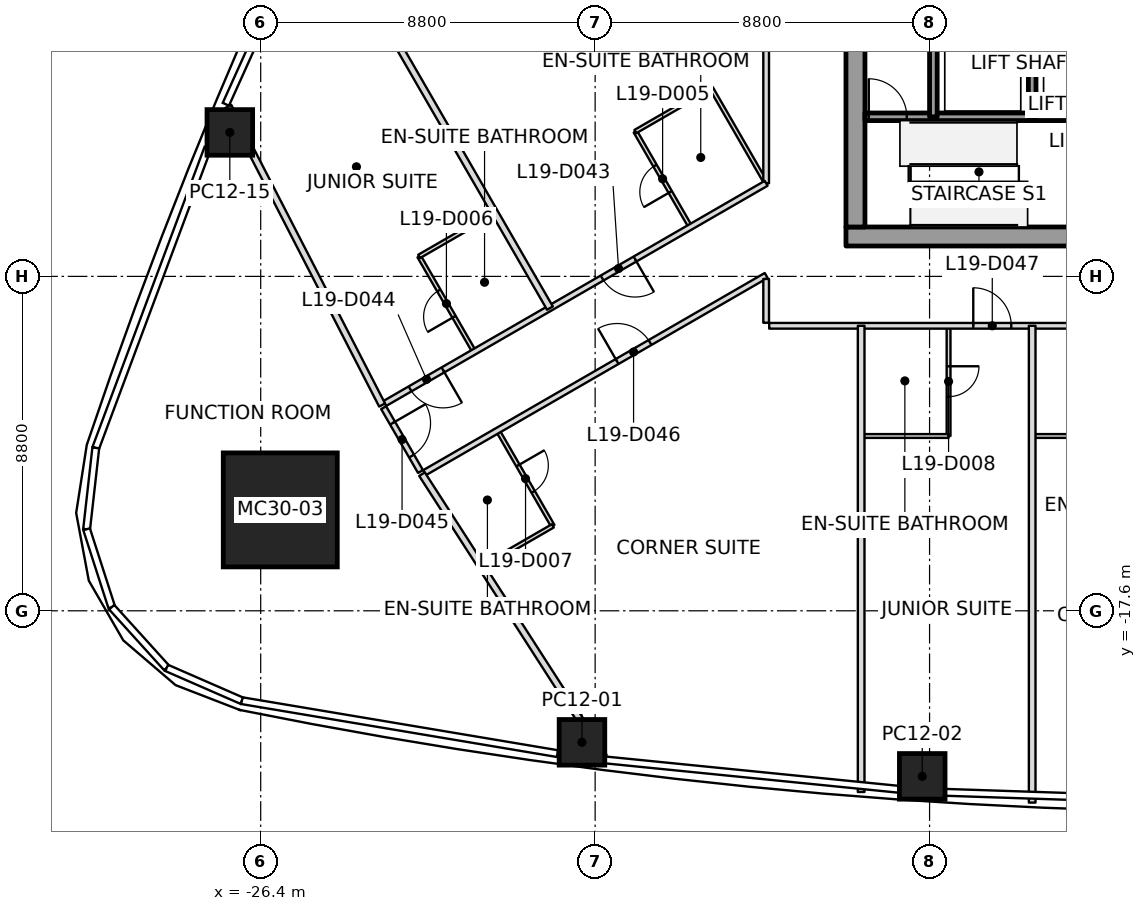
"""IFC4 building model, lengths in metres.
Left out: names, types, materials, properties, quantities, classifications, styles, units other than length and angle.
Written with IfcOpenShell. Run it as: python <this file> out.ifc"""

import sys

from ifc_helpers import new_model, si_unit, direction, frame, frame_2d, origin, origin_2d, place, context, subcontext, project, spatial, rectangle, extrude, element, fill, save


model = new_model("IFC4")
c1 = context("Model", 3, precision=1e-05, world=origin(), true_north=direction((0.0, 1.0)))
c2 = subcontext(c1, "Body", "Model", "MODEL_VIEW")
j1 = project(units=[si_unit("LENGTHUNIT", "METRE"), si_unit("PLANEANGLEUNIT", "RADIAN")], contexts=[c1])
p1 = place(None, origin())
s1 = spatial("IfcSite", under=j1, at=p1, CompositionType="ELEMENT")
p2 = place(p1, origin())
s2 = spatial("IfcBuilding", under=s1, at=p2, CompositionType="ELEMENT")
p3 = place(p2, frame((0.0, 0.0, 92.4)))
s3 = spatial("IfcBuildingStorey", under=s2, at=p3, CompositionType="ELEMENT", Elevation=92.4)
p4 = place(p3, frame((-25.885, -14.945, 0.0), z_axis=(0.030464101799, 0.017605877014, 0.99938079409), x_axis=(0.999535861539, -0.000536596285, -0.030459375615)))
e1 = element("IfcColumn", 1, at=p4, inside=s3, PredefinedType="COLUMN", context=c2, shape_type="SweptSolid", body=[
    extrude(rectangle(XDim=3.0, YDim=3.0, at=origin_2d()), origin(), (0.0, 0.0, 1.0), 3.702),
])
p5 = place(p3, frame((-17.946, -21.061, 0.0), z_axis=(0.019195542948, 0.011345819199, 0.999751370851), x_axis=(-0.990992704509, 0.132764775419, 0.017520674033)))
e2 = element("IfcColumn", 2, at=p5, inside=s3, PredefinedType="COLUMN", context=c2, shape_type="SweptSolid", body=[
    extrude(rectangle(XDim=1.2, YDim=1.2, at=origin_2d()), origin(), (0.0, 0.0, 1.0), 3.701),
])
p6 = place(p3, frame((-8.993, -21.957, 0.0), z_axis=(0.009566025428, 0.012138956406, 0.999880561315), x_axis=(-0.997745739106, 0.066536385186, 0.008737822466)))
e3 = element("IfcColumn", 3, at=p6, inside=s3, PredefinedType="COLUMN", context=c2, shape_type="SweptSolid", body=[
    extrude(rectangle(XDim=1.2, YDim=1.2, at=origin_2d()), origin(), (0.0, 0.0, 1.0), 3.701),
])
p7 = place(p3, frame((-27.212, -5.011, 0.0), z_axis=(0.019393432612, 0.011015997436, 0.999751240345), x_axis=(0.380717970692, 0.924524223098, -0.017572356073)))
e4 = element("IfcColumn", 4, at=p7, inside=s3, PredefinedType="COLUMN", context=c2, shape_type="SweptSolid", body=[
    extrude(rectangle(XDim=1.2, YDim=1.2, at=origin_2d()), origin(), (0.0, 0.0, 1.0), 3.701),
])
p8 = place(p3, frame((-11.0, -7.75, 0.0), z_axis=(0.0, 0.0, 1.0), x_axis=(1.0, 0.0, 0.0)))
e5 = element("IfcWall", 5, at=p8, inside=s3, PredefinedType="SHEAR", context=c2, shape_type="SweptSolid", body=[
    extrude(rectangle(XDim=22.0, YDim=0.5, at=frame_2d((11.0, 0.0))), origin(), (0.0, 0.0, 1.0), 3.7),
])
p9 = place(p8, frame((10.45, 0.0, 0.0)))
e6 = element("IfcOpeningElement", 6, at=p9, cuts=e5, PredefinedType="OPENING", context=c2, shape_type="SweptSolid", body=[
    extrude(rectangle(XDim=1.1, YDim=2.1, at=frame_2d((0.55, 1.05))), frame((0.0, 0.25, 0.0), z_axis=(0.0, -1.0, 0.0), x_axis=(1.0, 0.0, 0.0)), (0.0, 0.0, 1.0), 0.5),
])
p10 = place(p3, frame((-10.75, -7.5, 0.0), z_axis=(0.0, 0.0, 1.0), x_axis=(0.0, 1.0, 0.0)))
e7 = element("IfcWall", 7, at=p10, inside=s3, PredefinedType="SHEAR", context=c2, shape_type="SweptSolid", body=[
    extrude(rectangle(XDim=15.0, YDim=0.5, at=frame_2d((7.5, 0.0))), origin(), (0.0, 0.0, 1.0), 3.7),
])
p11 = place(p10, frame((6.6, 0.0, 0.0)))
e8 = element("IfcOpeningElement", 8, at=p11, cuts=e7, PredefinedType="OPENING", context=c2, shape_type="SweptSolid", body=[
    extrude(rectangle(XDim=1.8, YDim=2.1, at=frame_2d((0.9, 1.05))), frame((0.0, 0.25, 0.0), z_axis=(0.0, -1.0, 0.0), x_axis=(1.0, 0.0, 0.0)), (0.0, 0.0, 1.0), 0.5),
])
p12 = place(p3, frame((-10.5, -4.6, 0.0), z_axis=(0.0, 0.0, 1.0), x_axis=(1.0, 0.0, 0.0)))
e9 = element("IfcWall", 9, at=p12, inside=s3, PredefinedType="SOLIDWALL", context=c2, shape_type="SweptSolid", body=[
    extrude(rectangle(XDim=1.8, YDim=0.2, at=frame_2d((0.9, 0.0))), origin(), (0.0, 0.0, 1.0), 3.55),
])
p13 = place(p12, frame((0.1, 0.0, 0.0)))
e10 = element("IfcOpeningElement", 10, at=p13, cuts=e9, PredefinedType="OPENING", context=c2, shape_type="SweptSolid", body=[
    extrude(rectangle(XDim=1.0, YDim=2.1, at=frame_2d((0.5, 1.05))), frame((0.0, 0.1, 0.0), z_axis=(0.0, -1.0, 0.0), x_axis=(1.0, 0.0, 0.0)), (0.0, 0.0, 1.0), 0.2),
])
p14 = place(p3, frame((-8.7, -4.6, 0.0), z_axis=(0.0, 0.0, 1.0), x_axis=(1.0, 0.0, 0.0)))
e11 = element("IfcWall", 11, at=p14, inside=s3, PredefinedType="SOLIDWALL", context=c2, shape_type="SweptSolid", body=[
    extrude(rectangle(XDim=2.6, YDim=0.2, at=frame_2d((1.3, 0.0))), origin(), (0.0, 0.0, 1.0), 3.55),
])
p15 = place(p3, frame((-8.7, -4.6, 0.0), z_axis=(0.0, 0.0, 1.0), x_axis=(0.0, 1.0, 0.0)))
e12 = element("IfcWall", 12, at=p15, inside=s3, PredefinedType="SOLIDWALL", context=c2, shape_type="SweptSolid", body=[
    extrude(rectangle(XDim=2.8, YDim=0.2, at=frame_2d((1.4, 0.0))), origin(), (0.0, 0.0, 1.0), 3.55),
])
p16 = place(p3, frame((-6.1, -4.6, 0.0), z_axis=(0.0, 0.0, 1.0), x_axis=(1.0, 0.0, 0.0)))
e13 = element("IfcWall", 13, at=p16, inside=s3, PredefinedType="SOLIDWALL", context=c2, shape_type="SweptSolid", body=[
    extrude(rectangle(XDim=1.6, YDim=0.2, at=frame_2d((0.8, 0.0))), origin(), (0.0, 0.0, 1.0), 3.55),
])
p17 = place(p3, frame((-6.1, -4.6, 0.0), z_axis=(0.0, 0.0, 1.0), x_axis=(0.0, 1.0, 0.0)))
e14 = element("IfcWall", 14, at=p17, inside=s3, PredefinedType="SOLIDWALL", context=c2, shape_type="SweptSolid", body=[
    extrude(rectangle(XDim=2.8, YDim=0.2, at=frame_2d((1.4, 0.0))), origin(), (0.0, 0.0, 1.0), 3.55),
])
p18 = place(p3, frame((-23.206, -12.185, 0.0), z_axis=(0.0, 0.0, 1.0), x_axis=(-0.457776028904, 0.88906754938, 0.0)))
e15 = element("IfcWall", 15, at=p18, inside=s3, PredefinedType="PARTITIONING", context=c2, shape_type="SweptSolid", body=[
    extrude(rectangle(XDim=8.84, YDim=0.175, at=frame_2d((4.42, 0.0))), origin(), (0.0, 0.0, 1.0), 3.15),
])
p19 = place(p3, frame((-18.789, -9.635, 0.0), z_axis=(0.0, 0.0, 1.0), x_axis=(-0.500005395086, 0.866022288908, 0.0)))
e16 = element("IfcWall", 16, at=p19, inside=s3, PredefinedType="PARTITIONING", context=c2, shape_type="SweptSolid", body=[
    extrude(rectangle(XDim=12.523, YDim=0.175, at=frame_2d((6.262, 0.0))), origin(), (0.0, 0.0, 1.0), 2.934),
])
p20 = place(p3, frame((-17.372, -21.439, 0.0), z_axis=(0.0, 0.0, 1.0), x_axis=(-0.541052062042, 0.840989099906, 0.0)))
e17 = element("IfcWall", 17, at=p20, inside=s3, PredefinedType="PARTITIONING", context=c2, shape_type="SweptSolid", body=[
    extrude(rectangle(XDim=8.841, YDim=0.175, at=frame_2d((4.42, 0.0))), origin(), (0.0, 0.0, 1.0), 3.15),
])
p21 = place(p3, frame((-10.6, -10.1, 0.0), z_axis=(0.0, 0.0, 1.0), x_axis=(0.0, -1.0, 0.0)))
e18 = element("IfcWall", 18, at=p21, inside=s3, PredefinedType="PARTITIONING", context=c2, shape_type="SweptSolid", body=[
    extrude(rectangle(XDim=12.268, YDim=0.175, at=frame_2d((6.134, 0.0))), origin(), (0.0, 0.0, 1.0), 2.934),
])
p22 = place(p3, frame((-6.1, -10.1, 0.0), z_axis=(0.0, 0.0, 1.0), x_axis=(0.0, -1.0, 0.0)))
e19 = element("IfcWall", 19, at=p22, inside=s3, PredefinedType="PARTITIONING", context=c2, shape_type="SweptSolid", body=[
    extrude(rectangle(XDim=12.547, YDim=0.175, at=frame_2d((6.273, 0.0))), origin(), (0.0, 0.0, 1.0), 2.934),
])
p23 = place(p3, frame((-23.166, -12.255, 0.0), z_axis=(0.0, 0.0, 1.0), x_axis=(0.499969367985, -0.866043088465, 0.0)))
e20 = element("IfcWall", 20, at=p23, inside=s3, PredefinedType="PARTITIONING", context=c2, shape_type="SweptSolid", body=[
    extrude(rectangle(XDim=1.94, YDim=0.15, at=frame_2d((0.97, 0.0))), origin(), (0.0, 0.0, 1.0), 2.797),
])
p24 = place(p23, frame((0.47, 0.0, 0.0)))
e21 = element("IfcOpeningElement", 21, at=p24, cuts=e20, PredefinedType="OPENING", context=c2, shape_type="SweptSolid", body=[
    extrude(rectangle(XDim=1.0, YDim=2.1, at=frame_2d((0.5, 1.05))), frame((0.0, 0.075, 0.0), z_axis=(0.0, -1.0, 0.0), x_axis=(1.0, 0.0, 0.0)), (0.0, 0.0, 1.0), 0.15),
])
p25 = place(p3, frame((-13.1, 10.02, 0.0), z_axis=(0.0, 0.0, 1.0), x_axis=(0.0, -1.0, 0.0)))
e22 = element("IfcWall", 22, at=p25, inside=s3, PredefinedType="PARTITIONING", context=c2, shape_type="SweptSolid", body=[
    extrude(rectangle(XDim=16.371, YDim=0.15, at=frame_2d((8.186, 0.0))), origin(), (0.0, 0.0, 1.0), 2.947),
])
p26 = place(p25, frame((6.295, 0.0, 0.0)))
e23 = element("IfcOpeningElement", 23, at=p26, cuts=e22, PredefinedType="OPENING", context=c2, shape_type="SweptSolid", body=[
    extrude(rectangle(XDim=1.0, YDim=2.1, at=frame_2d((0.5, 1.05))), frame((0.0, 0.075, 0.0), z_axis=(0.0, -1.0, 0.0), x_axis=(1.0, 0.0, 0.0)), (0.0, 0.0, 1.0), 0.15),
])
p27 = place(p3, frame((-13.1, -6.351, 0.0), z_axis=(0.0, 0.0, 1.0), x_axis=(-0.866028069402, -0.499995382986, 0.0)))
e24 = element("IfcWall", 24, at=p27, inside=s3, PredefinedType="PARTITIONING", context=c2, shape_type="SweptSolid", body=[
    extrude(rectangle(XDim=11.589, YDim=0.15, at=frame_2d((5.794, 0.0))), origin(), (0.0, 0.0, 1.0), 2.947),
])
p28 = place(p27, frame((3.985, 0.0, 0.0)))
e25 = element("IfcOpeningElement", 25, at=p28, cuts=e24, PredefinedType="OPENING", context=c2, shape_type="SweptSolid", body=[
    extrude(rectangle(XDim=1.0, YDim=2.1, at=frame_2d((0.5, 1.05))), frame((0.0, 0.075, 0.0), z_axis=(0.0, -1.0, 0.0), x_axis=(1.0, 0.0, 0.0)), (0.0, 0.0, 1.0), 0.15),
])
p29 = place(p27, frame((9.819, 0.0, 0.0)))
e26 = element("IfcOpeningElement", 26, at=p29, cuts=e24, PredefinedType="OPENING", context=c2, shape_type="SweptSolid", body=[
    extrude(rectangle(XDim=1.0, YDim=2.1, at=frame_2d((0.5, 1.05))), frame((0.0, 0.075, 0.0), z_axis=(0.0, -1.0, 0.0), x_axis=(1.0, 0.0, 0.0)), (0.0, 0.0, 1.0), 0.15),
])
p30 = place(p3, frame((-22.086, -13.964, 0.0), z_axis=(0.0, 0.0, 1.0), x_axis=(0.866016323255, 0.500015727609, 0.0)))
e27 = element("IfcWall", 27, at=p30, inside=s3, PredefinedType="PARTITIONING", context=c2, shape_type="SweptSolid", body=[
    extrude(rectangle(XDim=10.377, YDim=0.15, at=frame_2d((5.188, 0.0))), origin(), (0.0, 0.0, 1.0), 2.797),
])
p31 = place(p30, frame((5.848, 0.0, 0.0)))
e28 = element("IfcOpeningElement", 28, at=p31, cuts=e27, PredefinedType="OPENING", context=c2, shape_type="SweptSolid", body=[
    extrude(rectangle(XDim=1.0, YDim=2.1, at=frame_2d((0.5, 1.05))), frame((0.0, 0.075, 0.0), z_axis=(0.0, -1.0, 0.0), x_axis=(1.0, 0.0, 0.0)), (0.0, 0.0, 1.0), 0.15),
])
p32 = place(p3, frame((-13.1, -8.867, 0.0), z_axis=(0.0, 0.0, 1.0), x_axis=(0.0, -1.0, 0.0)))
e29 = element("IfcWall", 29, at=p32, inside=s3, PredefinedType="PARTITIONING", context=c2, shape_type="SweptSolid", body=[
    extrude(rectangle(XDim=1.153, YDim=0.15, at=frame_2d((0.576, 0.0))), origin(), (0.0, 0.0, 1.0), 2.797),
])
p33 = place(p3, frame((-13.02, -10.1, 0.0), z_axis=(0.0, 0.0, 1.0), x_axis=(1.0, 0.0, 0.0)))
e30 = element("IfcWall", 30, at=p33, inside=s3, PredefinedType="PARTITIONING", context=c2, shape_type="SweptSolid", body=[
    extrude(rectangle(XDim=26.04, YDim=0.15, at=frame_2d((13.02, 0.0))), origin(), (0.0, 0.0, 1.0), 2.947),
])
p34 = place(p33, frame((5.37, 0.0, 0.0)))
e31 = element("IfcOpeningElement", 31, at=p34, cuts=e30, PredefinedType="OPENING", context=c2, shape_type="SweptSolid", body=[
    extrude(rectangle(XDim=1.0, YDim=2.1, at=frame_2d((0.5, 1.05))), frame((0.0, 0.075, 0.0), z_axis=(0.0, -1.0, 0.0), x_axis=(1.0, 0.0, 0.0)), (0.0, 0.0, 1.0), 0.15),
])
p35 = place(p33, frame((10.17, 0.0, 0.0)))
e32 = element("IfcOpeningElement", 32, at=p35, cuts=e30, PredefinedType="OPENING", context=c2, shape_type="SweptSolid", body=[
    extrude(rectangle(XDim=1.0, YDim=2.1, at=frame_2d((0.5, 1.05))), frame((0.0, 0.075, 0.0), z_axis=(0.0, -1.0, 0.0), x_axis=(1.0, 0.0, 0.0)), (0.0, 0.0, 1.0), 0.15),
])
p36 = place(p33, frame((14.97, 0.0, 0.0)))
e33 = element("IfcOpeningElement", 33, at=p36, cuts=e30, PredefinedType="OPENING", context=c2, shape_type="SweptSolid", body=[
    extrude(rectangle(XDim=1.0, YDim=2.1, at=frame_2d((0.5, 1.05))), frame((0.0, 0.075, 0.0), z_axis=(0.0, -1.0, 0.0), x_axis=(1.0, 0.0, 0.0)), (0.0, 0.0, 1.0), 0.15),
])
p37 = place(p33, frame((19.77, 0.0, 0.0)))
e34 = element("IfcOpeningElement", 34, at=p37, cuts=e30, PredefinedType="OPENING", context=c2, shape_type="SweptSolid", body=[
    extrude(rectangle(XDim=1.0, YDim=2.1, at=frame_2d((0.5, 1.05))), frame((0.0, 0.075, 0.0), z_axis=(0.0, -1.0, 0.0), x_axis=(1.0, 0.0, 0.0)), (0.0, 0.0, 1.0), 0.15),
])
p38 = place(p3, frame((-20.796, -10.76, 0.0), z_axis=(0.0, 0.0, 1.0), x_axis=(-0.499936001555, 0.866062350151, 0.0)))
e35 = element("IfcWall", 35, at=p38, inside=s3, PredefinedType="PARTITIONING", context=c2, shape_type="SweptSolid", body=[
    extrude(rectangle(XDim=2.87, YDim=0.1, at=frame_2d((1.435, 0.0))), origin(), (0.0, 0.0, 1.0), 3.15),
])
p39 = place(p38, frame((1.035, 0.0, 0.0)))
e36 = element("IfcOpeningElement", 36, at=p39, cuts=e35, PredefinedType="OPENING", context=c2, shape_type="SweptSolid", body=[
    extrude(rectangle(XDim=0.8, YDim=2.1, at=frame_2d((0.4, 1.05))), frame((0.0, 0.05, 0.0), z_axis=(0.0, -1.0, 0.0), x_axis=(1.0, 0.0, 0.0)), (0.0, 0.0, 1.0), 0.1),
])
p40 = place(p3, frame((-22.231, -8.274, 0.0), z_axis=(0.0, 0.0, 1.0), x_axis=(0.866017224141, 0.500014167291, 0.0)))
e37 = element("IfcWall", 37, at=p40, inside=s3, PredefinedType="PARTITIONING", context=c2, shape_type="SweptSolid", body=[
    extrude(rectangle(XDim=2.27, YDim=0.1, at=frame_2d((1.135, 0.0))), origin(), (0.0, 0.0, 1.0), 3.15),
])
p41 = place(p3, frame((-20.149, -12.88, 0.0), z_axis=(0.0, 0.0, 1.0), x_axis=(0.499936001555, -0.866062350151, 0.0)))
e38 = element("IfcWall", 38, at=p41, inside=s3, PredefinedType="PARTITIONING", context=c2, shape_type="SweptSolid", body=[
    extrude(rectangle(XDim=2.87, YDim=0.1, at=frame_2d((1.435, 0.0))), origin(), (0.0, 0.0, 1.0), 3.15),
])
p42 = place(p41, frame((1.035, 0.0, 0.0)))
e39 = element("IfcOpeningElement", 39, at=p42, cuts=e38, PredefinedType="OPENING", context=c2, shape_type="SweptSolid", body=[
    extrude(rectangle(XDim=0.8, YDim=2.1, at=frame_2d((0.4, 1.05))), frame((0.0, 0.05, 0.0), z_axis=(0.0, -1.0, 0.0), x_axis=(1.0, 0.0, 0.0)), (0.0, 0.0, 1.0), 0.1),
])
p43 = place(p3, frame((-18.714, -15.365, 0.0), z_axis=(0.0, 0.0, 1.0), x_axis=(-0.866017224141, -0.500014167291, 0.0)))
e40 = element("IfcWall", 40, at=p43, inside=s3, PredefinedType="PARTITIONING", context=c2, shape_type="SweptSolid", body=[
    extrude(rectangle(XDim=2.27, YDim=0.1, at=frame_2d((1.135, 0.0))), origin(), (0.0, 0.0, 1.0), 3.15),
])
p44 = place(p3, frame((-15.107, -7.475, 0.0), z_axis=(0.0, 0.0, 1.0), x_axis=(-0.500036638401, 0.866004249561, 0.0)))
e41 = element("IfcWall", 41, at=p44, inside=s3, PredefinedType="PARTITIONING", context=c2, shape_type="SweptSolid", body=[
    extrude(rectangle(XDim=2.87, YDim=0.1, at=frame_2d((1.435, 0.0))), origin(), (0.0, 0.0, 1.0), 3.15),
])
p45 = place(p44, frame((1.035, 0.0, 0.0)))
e42 = element("IfcOpeningElement", 42, at=p45, cuts=e41, PredefinedType="OPENING", context=c2, shape_type="SweptSolid", body=[
    extrude(rectangle(XDim=0.8, YDim=2.1, at=frame_2d((0.4, 1.05))), frame((0.0, 0.05, 0.0), z_axis=(0.0, -1.0, 0.0), x_axis=(1.0, 0.0, 0.0)), (0.0, 0.0, 1.0), 0.1),
])
p46 = place(p3, frame((-16.542, -4.99, 0.0), z_axis=(0.0, 0.0, 1.0), x_axis=(0.866007057882, 0.500031774688, 0.0)))
e43 = element("IfcWall", 43, at=p46, inside=s3, PredefinedType="PARTITIONING", context=c2, shape_type="SweptSolid", body=[
    extrude(rectangle(XDim=2.3, YDim=0.1, at=frame_2d((1.15, 0.0))), origin(), (0.0, 0.0, 1.0), 2.947),
])
p47 = place(p3, frame((-14.55, -3.839, 0.0), z_axis=(0.0, 0.0, 1.0), x_axis=(0.500049861556, -0.865996614288, 0.0)))
e44 = element("IfcWall", 44, at=p47, inside=s3, PredefinedType="PARTITIONING", context=c2, shape_type="SweptSolid", body=[
    extrude(rectangle(XDim=2.84, YDim=0.1, at=frame_2d((1.42, 0.0))), origin(), (0.0, 0.0, 1.0), 2.947),
])
p48 = place(p3, frame((-8.3, -10.13, 0.0), z_axis=(0.0, 0.0, 1.0), x_axis=(0.0, -1.0, 0.0)))
e45 = element("IfcWall", 45, at=p48, inside=s3, PredefinedType="PARTITIONING", context=c2, shape_type="SweptSolid", body=[
    extrude(rectangle(XDim=2.87, YDim=0.1, at=frame_2d((1.435, 0.0))), origin(), (0.0, 0.0, 1.0), 3.15),
])
p49 = place(p48, frame((1.035, 0.0, 0.0)))
e46 = element("IfcOpeningElement", 46, at=p49, cuts=e45, PredefinedType="OPENING", context=c2, shape_type="SweptSolid", body=[
    extrude(rectangle(XDim=0.8, YDim=2.1, at=frame_2d((0.4, 1.05))), frame((0.0, 0.05, 0.0), z_axis=(0.0, -1.0, 0.0), x_axis=(1.0, 0.0, 0.0)), (0.0, 0.0, 1.0), 0.1),
])
p50 = place(p3, frame((-8.3, -13.0, 0.0), z_axis=(0.0, 0.0, 1.0), x_axis=(-1.0, 0.0, 0.0)))
e47 = element("IfcWall", 47, at=p50, inside=s3, PredefinedType="PARTITIONING", context=c2, shape_type="SweptSolid", body=[
    extrude(rectangle(XDim=2.27, YDim=0.1, at=frame_2d((1.135, 0.0))), origin(), (0.0, 0.0, 1.0), 3.15),
])
p51 = place(p3, frame((-3.8, -13.0, 0.0), z_axis=(0.0, 0.0, 1.0), x_axis=(-1.0, 0.0, 0.0)))
e48 = element("IfcWall", 48, at=p51, inside=s3, PredefinedType="PARTITIONING", context=c2, shape_type="SweptSolid", body=[
    extrude(rectangle(XDim=2.27, YDim=0.1, at=frame_2d((1.135, 0.0))), origin(), (0.0, 0.0, 1.0), 3.017),
])
p52 = place(p28, origin())
e49 = element("IfcDoor", 49, at=p52, inside=s3, OperationType="SINGLE_SWING_LEFT", PredefinedType="DOOR", context=c2, shape_type="SweptSolid", body=[
    extrude(rectangle(XDim=1.0, YDim=2.1, at=frame_2d((0.5, 1.05))), frame((0.0, 0.025, 0.0), z_axis=(0.0, -1.0, 0.0), x_axis=(1.0, 0.0, 0.0)), (0.0, 0.0, 1.0), 0.05),
])
fill(e25, e49)
p53 = place(p45, origin())
e50 = element("IfcDoor", 50, at=p53, inside=s3, OperationType="SINGLE_SWING_RIGHT", PredefinedType="DOOR", context=c2, shape_type="SweptSolid", body=[
    extrude(rectangle(XDim=0.8, YDim=2.1, at=frame_2d((0.4, 1.05))), frame((0.0, 0.025, 0.0), z_axis=(0.0, -1.0, 0.0), x_axis=(1.0, 0.0, 0.0)), (0.0, 0.0, 1.0), 0.05),
])
fill(e42, e50)
p54 = place(p29, origin())
e51 = element("IfcDoor", 51, at=p54, inside=s3, OperationType="SINGLE_SWING_LEFT", PredefinedType="DOOR", context=c2, shape_type="SweptSolid", body=[
    extrude(rectangle(XDim=1.0, YDim=2.1, at=frame_2d((0.5, 1.05))), frame((0.0, 0.025, 0.0), z_axis=(0.0, -1.0, 0.0), x_axis=(1.0, 0.0, 0.0)), (0.0, 0.0, 1.0), 0.05),
])
fill(e26, e51)
p55 = place(p39, origin())
e52 = element("IfcDoor", 52, at=p55, inside=s3, OperationType="SINGLE_SWING_LEFT", PredefinedType="DOOR", context=c2, shape_type="SweptSolid", body=[
    extrude(rectangle(XDim=0.8, YDim=2.1, at=frame_2d((0.4, 1.05))), frame((0.0, 0.025, 0.0), z_axis=(0.0, -1.0, 0.0), x_axis=(1.0, 0.0, 0.0)), (0.0, 0.0, 1.0), 0.05),
])
fill(e36, e52)
p56 = place(p24, origin())
e53 = element("IfcDoor", 53, at=p56, inside=s3, OperationType="SINGLE_SWING_LEFT", PredefinedType="DOOR", context=c2, shape_type="SweptSolid", body=[
    extrude(rectangle(XDim=1.0, YDim=2.1, at=frame_2d((0.5, 1.05))), frame((0.0, 0.025, 0.0), z_axis=(0.0, -1.0, 0.0), x_axis=(1.0, 0.0, 0.0)), (0.0, 0.0, 1.0), 0.05),
])
fill(e21, e53)
p57 = place(p31, origin())
e54 = element("IfcDoor", 54, at=p57, inside=s3, OperationType="SINGLE_SWING_LEFT", PredefinedType="DOOR", context=c2, shape_type="SweptSolid", body=[
    extrude(rectangle(XDim=1.0, YDim=2.1, at=frame_2d((0.5, 1.05))), frame((0.0, 0.025, 0.0), z_axis=(0.0, -1.0, 0.0), x_axis=(1.0, 0.0, 0.0)), (0.0, 0.0, 1.0), 0.05),
])
fill(e28, e54)
p58 = place(p42, origin())
e55 = element("IfcDoor", 55, at=p58, inside=s3, OperationType="SINGLE_SWING_LEFT", PredefinedType="DOOR", context=c2, shape_type="SweptSolid", body=[
    extrude(rectangle(XDim=0.8, YDim=2.1, at=frame_2d((0.4, 1.05))), frame((0.0, 0.025, 0.0), z_axis=(0.0, -1.0, 0.0), x_axis=(1.0, 0.0, 0.0)), (0.0, 0.0, 1.0), 0.05),
])
fill(e39, e55)
p59 = place(p34, origin())
e56 = element("IfcDoor", 56, at=p59, inside=s3, OperationType="SINGLE_SWING_LEFT", PredefinedType="DOOR", context=c2, shape_type="SweptSolid", body=[
    extrude(rectangle(XDim=1.0, YDim=2.1, at=frame_2d((0.5, 1.05))), frame((0.0, 0.025, 0.0), z_axis=(0.0, -1.0, 0.0), x_axis=(1.0, 0.0, 0.0)), (0.0, 0.0, 1.0), 0.05),
])
fill(e31, e56)
p60 = place(p49, origin())
e57 = element("IfcDoor", 57, at=p60, inside=s3, OperationType="SINGLE_SWING_LEFT", PredefinedType="DOOR", context=c2, shape_type="SweptSolid", body=[
    extrude(rectangle(XDim=0.8, YDim=2.1, at=frame_2d((0.4, 1.05))), frame((0.0, 0.025, 0.0), z_axis=(0.0, -1.0, 0.0), x_axis=(1.0, 0.0, 0.0)), (0.0, 0.0, 1.0), 0.05),
])
fill(e46, e57)
p61 = place(p13, origin())
e58 = element("IfcDoor", 58, at=p61, inside=s3, OperationType="SINGLE_SWING_LEFT", PredefinedType="DOOR", context=c2, shape_type="SweptSolid", body=[
    extrude(rectangle(XDim=1.0, YDim=2.1, at=frame_2d((0.5, 1.05))), frame((0.0, 0.025, 0.0), z_axis=(0.0, -1.0, 0.0), x_axis=(1.0, 0.0, 0.0)), (0.0, 0.0, 1.0), 0.05),
])
fill(e10, e58)
save(model, sys.argv[1])
